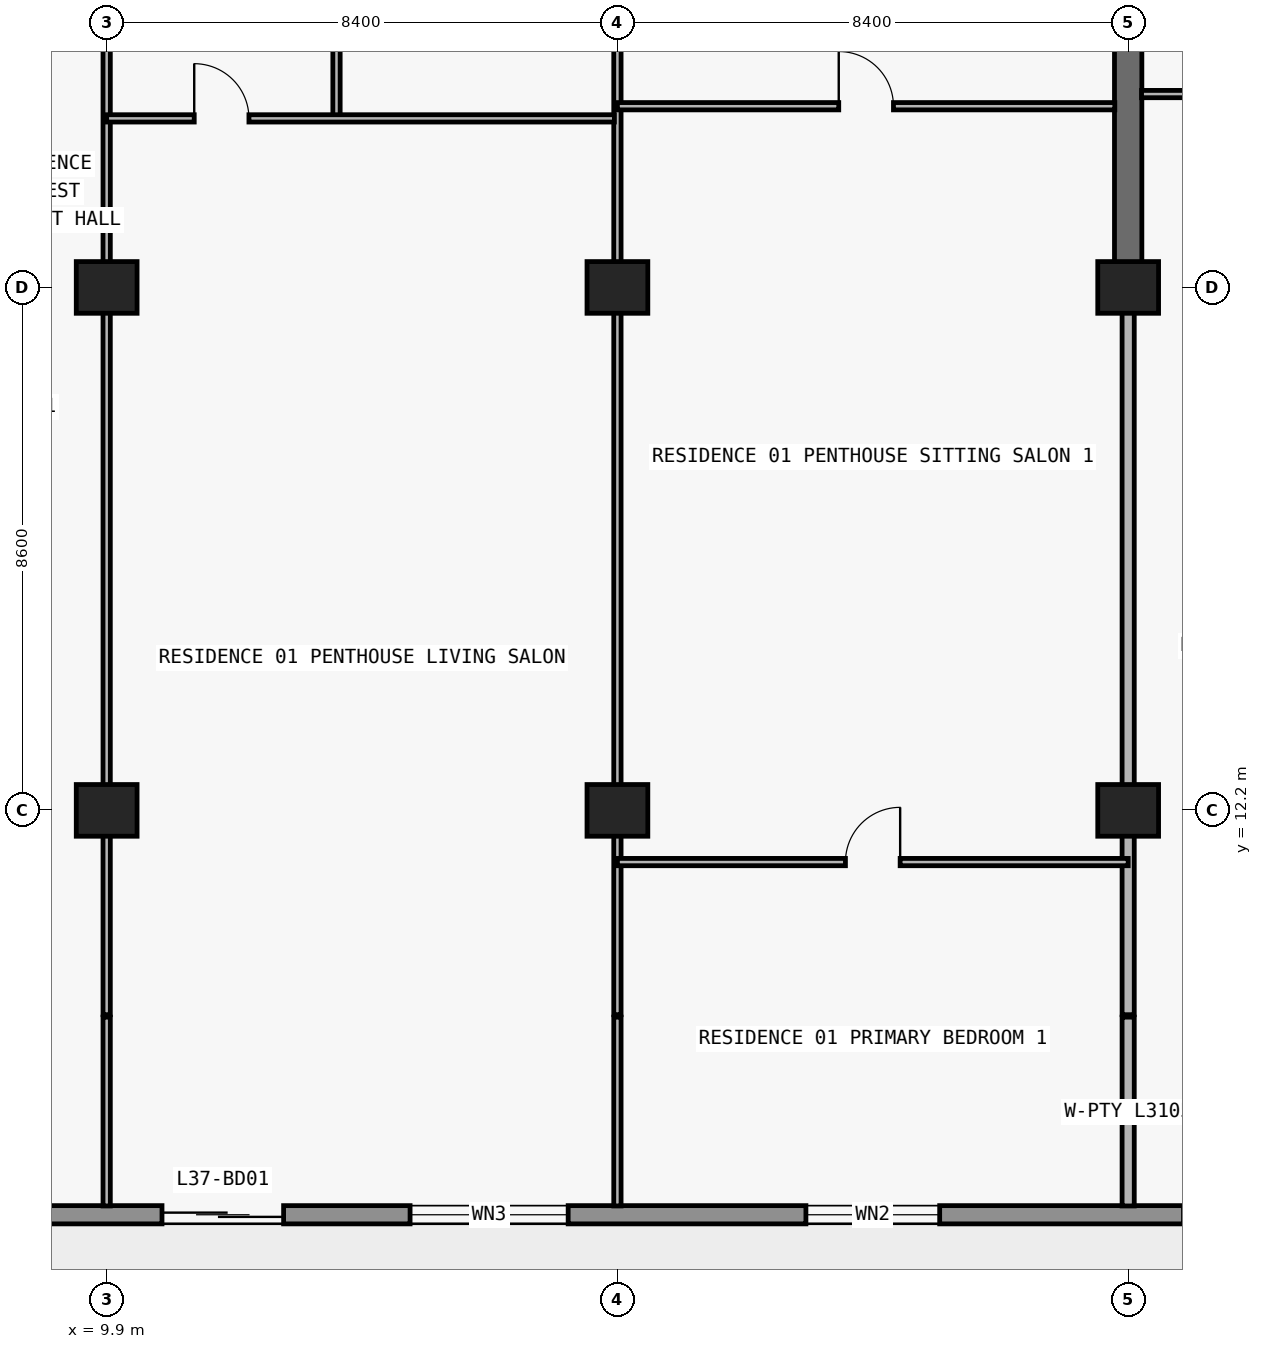
"""IFC4 building model, lengths in metres.
Left out: names, types, materials, properties, quantities, classifications, styles, units other than length and angle.
Written with IfcOpenShell. Run it as: python <this file> out.ifc"""

import sys

from ifc_helpers import new_model, si_unit, direction, frame, frame_2d, origin, origin_2d, place, context, subcontext, project, spatial, rectangle, extrude, element, fill, save


model = new_model("IFC4")
c1 = context("Model", 3, precision=1e-05, world=origin(), true_north=direction((0.0, 1.0)))
c2 = subcontext(c1, "Body", "Model", "MODEL_VIEW")
j1 = project(units=[si_unit("LENGTHUNIT", "METRE"), si_unit("PLANEANGLEUNIT", "RADIAN")], contexts=[c1])
p1 = place(None, origin())
s1 = spatial("IfcSite", under=j1, at=p1, CompositionType="ELEMENT")
p2 = place(p1, origin())
s2 = spatial("IfcBuilding", under=s1, at=p2, CompositionType="ELEMENT")
p3 = place(p2, frame((0.0, 0.0, 135.6)))
s3 = spatial("IfcBuildingStorey", under=s2, at=p3, CompositionType="ELEMENT", Elevation=135.6)
for number, where, z_axis, x_axis in (
    (1, (9.9, 12.2, 0.0), (0.0, 0.0, 1.0), (1.0, 0.0, 0.0)),
    (2, (18.3, 12.2, 0.0), (0.0, 0.0, 1.0), (1.0, 0.0, 0.0)),
    (3, (26.7, 12.2, 0.0), (0.0, 0.0, 1.0), (1.0, 0.0, 0.0)),
    (4, (9.9, 20.8, 0.0), (0.0, 0.0, 1.0), (1.0, 0.0, 0.0)),
    (5, (18.3, 20.8, 0.0), (0.0, 0.0, 1.0), (1.0, 0.0, 0.0)),
    (6, (26.7, 20.8, 0.0), (0.0, 0.0, 1.0), (1.0, 0.0, 0.0)),
):
    element("IfcColumn", number, at=place(p3, frame(where, z_axis=z_axis, x_axis=x_axis)), inside=s3, PredefinedType="COLUMN", context=c2, shape_type="SweptSolid", body=[
        extrude(rectangle(XDim=1.0, YDim=0.85, at=origin_2d()), origin(), (0.0, 0.0, 1.0), 3.05),
    ])
p4 = place(p3, frame((26.7, 20.8, 0.0), z_axis=(0.0, 0.0, 1.0), x_axis=(0.0, 1.0, 0.0)))
e7 = element("IfcWall", 7, at=p4, inside=s3, PredefinedType="SHEAR", context=c2, shape_type="SweptSolid", body=[
    extrude(rectangle(XDim=8.6, YDim=0.45, at=frame_2d((4.3, 0.0))), origin(), (0.0, 0.0, 1.0), 3.05),
])
p5 = place(p3, frame((70.1, 5.55, 0.0), z_axis=(0.0, 0.0, 1.0), x_axis=(-1.0, 0.0, 0.0)))
e8 = element("IfcWall", 8, at=p5, inside=s3, PredefinedType="STANDARD", context=c2, shape_type="SweptSolid", body=[
    extrude(rectangle(XDim=62.4, YDim=0.3, at=frame_2d((31.2, 0.0))), origin(), (0.0, 0.0, 1.0), 3.05),
])
p6 = place(p5, frame((57.29, 0.0, 0.0)))
e9 = element("IfcOpeningElement", 9, at=p6, cuts=e8, PredefinedType="OPENING", context=c2, shape_type="SweptSolid", body=[
    extrude(rectangle(XDim=2.0, YDim=2.3, at=frame_2d((1.0, 1.15))), frame((0.0, 0.16, 0.0), z_axis=(0.0, -1.0, 0.0), x_axis=(1.0, 0.0, 0.0)), (0.0, 0.0, 1.0), 0.32),
])
p7 = place(p5, frame((52.61, 0.0, 0.65)))
e10 = element("IfcOpeningElement", 10, at=p7, cuts=e8, PredefinedType="OPENING", context=c2, shape_type="SweptSolid", body=[
    extrude(rectangle(XDim=2.6, YDim=1.85, at=frame_2d((1.3, 0.925))), frame((0.0, 0.16, 0.0), z_axis=(0.0, -1.0, 0.0), x_axis=(1.0, 0.0, 0.0)), (0.0, 0.0, 1.0), 0.32),
])
p8 = place(p5, frame((46.5, 0.0, 0.85)))
e11 = element("IfcOpeningElement", 11, at=p8, cuts=e8, PredefinedType="OPENING", context=c2, shape_type="SweptSolid", body=[
    extrude(rectangle(XDim=2.2, YDim=1.55, at=frame_2d((1.1, 0.775))), frame((0.0, 0.16, 0.0), z_axis=(0.0, -1.0, 0.0), x_axis=(1.0, 0.0, 0.0)), (0.0, 0.0, 1.0), 0.32),
])
p9 = place(p5, frame((40.49, 0.0, 0.0)))
e12 = element("IfcOpeningElement", 12, at=p9, cuts=e8, PredefinedType="OPENING", context=c2, shape_type="SweptSolid", body=[
    extrude(rectangle(XDim=2.0, YDim=2.3, at=frame_2d((1.0, 1.15))), frame((0.0, 0.16, 0.0), z_axis=(0.0, -1.0, 0.0), x_axis=(1.0, 0.0, 0.0)), (0.0, 0.0, 1.0), 0.32),
])
p10 = place(p5, frame((35.81, 0.0, 0.65)))
e13 = element("IfcOpeningElement", 13, at=p10, cuts=e8, PredefinedType="OPENING", context=c2, shape_type="SweptSolid", body=[
    extrude(rectangle(XDim=2.6, YDim=1.85, at=frame_2d((1.3, 0.925))), frame((0.0, 0.16, 0.0), z_axis=(0.0, -1.0, 0.0), x_axis=(1.0, 0.0, 0.0)), (0.0, 0.0, 1.0), 0.32),
])
p11 = place(p5, frame((30.1, 0.0, 0.85)))
e14 = element("IfcOpeningElement", 14, at=p11, cuts=e8, PredefinedType="OPENING", context=c2, shape_type="SweptSolid", body=[
    extrude(rectangle(XDim=2.2, YDim=1.55, at=frame_2d((1.1, 0.775))), frame((0.0, 0.16, 0.0), z_axis=(0.0, -1.0, 0.0), x_axis=(1.0, 0.0, 0.0)), (0.0, 0.0, 1.0), 0.32),
])
p12 = place(p5, frame((22.1, 0.0, 0.85)))
e15 = element("IfcOpeningElement", 15, at=p12, cuts=e8, PredefinedType="OPENING", context=c2, shape_type="SweptSolid", body=[
    extrude(rectangle(XDim=2.2, YDim=1.55, at=frame_2d((1.1, 0.775))), frame((0.0, 0.16, 0.0), z_axis=(0.0, -1.0, 0.0), x_axis=(1.0, 0.0, 0.0)), (0.0, 0.0, 1.0), 0.32),
])
p13 = place(p5, frame((16.026, 0.0, 0.0)))
e16 = element("IfcOpeningElement", 16, at=p13, cuts=e8, PredefinedType="OPENING", context=c2, shape_type="SweptSolid", body=[
    extrude(rectangle(XDim=2.0, YDim=2.3, at=frame_2d((1.0, 1.15))), frame((0.0, 0.16, 0.0), z_axis=(0.0, -1.0, 0.0), x_axis=(1.0, 0.0, 0.0)), (0.0, 0.0, 1.0), 0.32),
])
p14 = place(p5, frame((11.726, 0.0, 0.85)))
e17 = element("IfcOpeningElement", 17, at=p14, cuts=e8, PredefinedType="OPENING", context=c2, shape_type="SweptSolid", body=[
    extrude(rectangle(XDim=2.2, YDim=1.55, at=frame_2d((1.1, 0.775))), frame((0.0, 0.16, 0.0), z_axis=(0.0, -1.0, 0.0), x_axis=(1.0, 0.0, 0.0)), (0.0, 0.0, 1.0), 0.32),
])
p15 = place(p5, frame((7.29, 0.0, 0.0)))
e18 = element("IfcOpeningElement", 18, at=p15, cuts=e8, PredefinedType="OPENING", context=c2, shape_type="SweptSolid", body=[
    extrude(rectangle(XDim=2.0, YDim=2.3, at=frame_2d((1.0, 1.15))), frame((0.0, 0.16, 0.0), z_axis=(0.0, -1.0, 0.0), x_axis=(1.0, 0.0, 0.0)), (0.0, 0.0, 1.0), 0.32),
])
p16 = place(p5, frame((3.19, 0.0, 0.85)))
e19 = element("IfcOpeningElement", 19, at=p16, cuts=e8, PredefinedType="OPENING", context=c2, shape_type="SweptSolid", body=[
    extrude(rectangle(XDim=1.8, YDim=1.55, at=frame_2d((0.9, 0.775))), frame((0.0, 0.16, 0.0), z_axis=(0.0, -1.0, 0.0), x_axis=(1.0, 0.0, 0.0)), (0.0, 0.0, 1.0), 0.32),
])
p17 = place(p3, frame((9.9, 5.695, 0.0), z_axis=(0.0, 0.0, 1.0), x_axis=(0.0, 1.0, 0.0)))
e20 = element("IfcWall", 20, at=p17, inside=s3, PredefinedType="PARTITIONING", context=c2, shape_type="SweptSolid", body=[
    extrude(rectangle(XDim=3.105, YDim=0.12, at=frame_2d((1.552, 0.0))), origin(), (0.0, 0.0, 1.0), 3.05),
])
p18 = place(p3, frame((9.9, 8.84, 0.0), z_axis=(0.0, 0.0, 1.0), x_axis=(0.0, 1.0, 0.0)))
e21 = element("IfcWall", 21, at=p18, inside=s3, PredefinedType="PARTITIONING", context=c2, shape_type="SweptSolid", body=[
    extrude(rectangle(XDim=19.94, YDim=0.12, at=frame_2d((9.97, 0.0))), origin(), (0.0, 0.0, 1.0), 2.174),
])
p19 = place(p18, frame((16.69, 0.0, 0.0)))
e22 = element("IfcOpeningElement", 22, at=p19, cuts=e21, PredefinedType="OPENING", context=c2, shape_type="SweptSolid", body=[
    extrude(rectangle(XDim=0.9, YDim=2.124, at=frame_2d((0.45, 1.062))), frame((0.0, 0.07, 0.0), z_axis=(0.0, -1.0, 0.0), x_axis=(1.0, 0.0, 0.0)), (0.0, 0.0, 1.0), 0.14),
])
p20 = place(p3, frame((13.68, 23.58, 0.0), z_axis=(0.0, 0.0, 1.0), x_axis=(0.0, 1.0, 0.0)))
e23 = element("IfcWall", 23, at=p20, inside=s3, PredefinedType="PARTITIONING", context=c2, shape_type="SweptSolid", body=[
    extrude(rectangle(XDim=4.8, YDim=0.12, at=frame_2d((2.4, 0.0))), origin(), (0.0, 0.0, 1.0), 3.05),
])
p21 = place(p20, frame((1.95, 0.0, 0.0)))
e24 = element("IfcOpeningElement", 24, at=p21, cuts=e23, PredefinedType="OPENING", context=c2, shape_type="SweptSolid", body=[
    extrude(rectangle(XDim=0.9, YDim=2.15, at=frame_2d((0.45, 1.075))), frame((0.0, 0.07, 0.0), z_axis=(0.0, -1.0, 0.0), x_axis=(1.0, 0.0, 0.0)), (0.0, 0.0, 1.0), 0.14),
])
p22 = place(p3, frame((18.3, 5.695, 0.0), z_axis=(0.0, 0.0, 1.0), x_axis=(0.0, 1.0, 0.0)))
e25 = element("IfcWall", 25, at=p22, inside=s3, PredefinedType="PARTITIONING", context=c2, shape_type="SweptSolid", body=[
    extrude(rectangle(XDim=3.105, YDim=0.12, at=frame_2d((1.552, 0.0))), origin(), (0.0, 0.0, 1.0), 3.05),
])
p23 = place(p3, frame((18.3, 8.84, 0.0), z_axis=(0.0, 0.0, 1.0), x_axis=(0.0, 1.0, 0.0)))
e26 = element("IfcWall", 26, at=p23, inside=s3, PredefinedType="PARTITIONING", context=c2, shape_type="SweptSolid", body=[
    extrude(rectangle(XDim=19.94, YDim=0.12, at=frame_2d((9.97, 0.0))), origin(), (0.0, 0.0, 1.0), 2.174),
])
p24 = place(p23, frame((16.69, 0.0, 0.0)))
e27 = element("IfcOpeningElement", 27, at=p24, cuts=e26, PredefinedType="OPENING", context=c2, shape_type="SweptSolid", body=[
    extrude(rectangle(XDim=0.9, YDim=2.124, at=frame_2d((0.45, 1.062))), frame((0.0, 0.07, 0.0), z_axis=(0.0, -1.0, 0.0), x_axis=(1.0, 0.0, 0.0)), (0.0, 0.0, 1.0), 0.14),
])
p25 = place(p3, frame((26.7, 5.695, 0.0), z_axis=(0.0, 0.0, 1.0), x_axis=(0.0, 1.0, 0.0)))
e28 = element("IfcWall", 28, at=p25, inside=s3, PredefinedType="PARTITIONING", context=c2, shape_type="SweptSolid", body=[
    extrude(rectangle(XDim=3.105, YDim=0.2, at=frame_2d((1.552, 0.0))), origin(), (0.0, 0.0, 1.0), 3.05),
])
p26 = place(p3, frame((26.7, 8.84, 0.0), z_axis=(0.0, 0.0, 1.0), x_axis=(0.0, 1.0, 0.0)))
e29 = element("IfcWall", 29, at=p26, inside=s3, PredefinedType="PARTITIONING", context=c2, shape_type="SweptSolid", body=[
    extrude(rectangle(XDim=11.955, YDim=0.2, at=frame_2d((5.978, 0.0))), origin(), (0.0, 0.0, 1.0), 2.174),
])
p27 = place(p3, frame((18.3, 11.35, 0.0), z_axis=(0.0, 0.0, 1.0), x_axis=(1.0, 0.0, 0.0)))
e30 = element("IfcWall", 30, at=p27, inside=s3, PredefinedType="PARTITIONING", context=c2, shape_type="SweptSolid", body=[
    extrude(rectangle(XDim=8.4, YDim=0.12, at=frame_2d((4.2, 0.0))), origin(), (0.0, 0.0, 1.0), 3.05),
])
p28 = place(p27, frame((3.75, 0.0, 0.0)))
e31 = element("IfcOpeningElement", 31, at=p28, cuts=e30, PredefinedType="OPENING", context=c2, shape_type="SweptSolid", body=[
    extrude(rectangle(XDim=0.9, YDim=2.15, at=frame_2d((0.45, 1.075))), frame((0.0, 0.07, 0.0), z_axis=(0.0, -1.0, 0.0), x_axis=(1.0, 0.0, 0.0)), (0.0, 0.0, 1.0), 0.14),
])
p29 = place(p3, frame((9.9, 23.58, 0.0), z_axis=(0.0, 0.0, 1.0), x_axis=(1.0, 0.0, 0.0)))
e32 = element("IfcWall", 32, at=p29, inside=s3, PredefinedType="PARTITIONING", context=c2, shape_type="SweptSolid", body=[
    extrude(rectangle(XDim=8.35, YDim=0.12, at=frame_2d((4.175, 0.0))), origin(), (0.0, 0.0, 1.0), 3.05),
])
p30 = place(p29, frame((1.44, 0.0, 0.0)))
e33 = element("IfcOpeningElement", 33, at=p30, cuts=e32, PredefinedType="OPENING", context=c2, shape_type="SweptSolid", body=[
    extrude(rectangle(XDim=0.9, YDim=2.15, at=frame_2d((0.45, 1.075))), frame((0.0, 0.07, 0.0), z_axis=(0.0, -1.0, 0.0), x_axis=(1.0, 0.0, 0.0)), (0.0, 0.0, 1.0), 0.14),
])
p31 = place(p3, frame((18.3, 23.78, 0.0), z_axis=(0.0, 0.0, 1.0), x_axis=(1.0, 0.0, 0.0)))
e34 = element("IfcWall", 34, at=p31, inside=s3, PredefinedType="PARTITIONING", context=c2, shape_type="SweptSolid", body=[
    extrude(rectangle(XDim=8.18, YDim=0.12, at=frame_2d((4.09, 0.0))), origin(), (0.0, 0.0, 1.0), 3.05),
])
p32 = place(p31, frame((3.64, 0.0, 0.0)))
e35 = element("IfcOpeningElement", 35, at=p32, cuts=e34, PredefinedType="OPENING", context=c2, shape_type="SweptSolid", body=[
    extrude(rectangle(XDim=0.9, YDim=2.15, at=frame_2d((0.45, 1.075))), frame((0.0, 0.07, 0.0), z_axis=(0.0, -1.0, 0.0), x_axis=(1.0, 0.0, 0.0)), (0.0, 0.0, 1.0), 0.14),
])
p33 = place(p3, frame((26.92, 23.98, 0.0), z_axis=(0.0, 0.0, 1.0), x_axis=(1.0, 0.0, 0.0)))
e36 = element("IfcWall", 36, at=p33, inside=s3, PredefinedType="PARTITIONING", context=c2, shape_type="SweptSolid", body=[
    extrude(rectangle(XDim=8.18, YDim=0.12, at=frame_2d((4.09, 0.0))), origin(), (0.0, 0.0, 1.0), 3.05),
])
p34 = place(p33, frame((1.204, 0.0, 0.0)))
e37 = element("IfcOpeningElement", 37, at=p34, cuts=e36, PredefinedType="OPENING", context=c2, shape_type="SweptSolid", body=[
    extrude(rectangle(XDim=0.9, YDim=2.15, at=frame_2d((0.45, 1.075))), frame((0.0, 0.07, 0.0), z_axis=(0.0, -1.0, 0.0), x_axis=(1.0, 0.0, 0.0)), (0.0, 0.0, 1.0), 0.14),
])
p35 = place(p6, origin())
e38 = element("IfcDoor", 38, at=p35, inside=s3, OperationType="DOUBLE_DOOR_SLIDING", PredefinedType="DOOR", context=c2, shape_type="SweptSolid", body=[
    extrude(rectangle(XDim=2.0, YDim=2.3, at=frame_2d((1.0, 1.15))), frame((0.0, 0.025, 0.0), z_axis=(0.0, -1.0, 0.0), x_axis=(1.0, 0.0, 0.0)), (0.0, 0.0, 1.0), 0.05),
])
fill(e9, e38)
p36 = place(p7, origin())
e39 = element("IfcWindow", 39, at=p36, inside=s3, PartitioningType="SINGLE_PANEL", PredefinedType="WINDOW", context=c2, shape_type="SweptSolid", body=[
    extrude(rectangle(XDim=2.6, YDim=1.85, at=frame_2d((1.3, 0.925))), frame((0.0, 0.03, 0.0), z_axis=(0.0, -1.0, 0.0), x_axis=(1.0, 0.0, 0.0)), (0.0, 0.0, 1.0), 0.06),
])
fill(e10, e39)
p37 = place(p8, origin())
e40 = element("IfcWindow", 40, at=p37, inside=s3, PartitioningType="SINGLE_PANEL", PredefinedType="WINDOW", context=c2, shape_type="SweptSolid", body=[
    extrude(rectangle(XDim=2.2, YDim=1.55, at=frame_2d((1.1, 0.775))), frame((0.0, 0.03, 0.0), z_axis=(0.0, -1.0, 0.0), x_axis=(1.0, 0.0, 0.0)), (0.0, 0.0, 1.0), 0.06),
])
fill(e11, e40)
p38 = place(p30, origin())
e41 = element("IfcDoor", 41, at=p38, inside=s3, OperationType="SINGLE_SWING_LEFT", PredefinedType="DOOR", context=c2, shape_type="SweptSolid", body=[
    extrude(rectangle(XDim=0.9, YDim=2.15, at=frame_2d((0.45, 1.075))), frame((0.0, 0.025, 0.0), z_axis=(0.0, -1.0, 0.0), x_axis=(1.0, 0.0, 0.0)), (0.0, 0.0, 1.0), 0.05),
])
fill(e33, e41)
p39 = place(p32, origin())
e42 = element("IfcDoor", 42, at=p39, inside=s3, OperationType="SINGLE_SWING_LEFT", PredefinedType="DOOR", context=c2, shape_type="SweptSolid", body=[
    extrude(rectangle(XDim=0.9, YDim=2.15, at=frame_2d((0.45, 1.075))), frame((0.0, 0.025, 0.0), z_axis=(0.0, -1.0, 0.0), x_axis=(1.0, 0.0, 0.0)), (0.0, 0.0, 1.0), 0.05),
])
fill(e35, e42)
p40 = place(p28, origin())
e43 = element("IfcDoor", 43, at=p40, inside=s3, OperationType="SINGLE_SWING_RIGHT", PredefinedType="DOOR", context=c2, shape_type="SweptSolid", body=[
    extrude(rectangle(XDim=0.9, YDim=2.15, at=frame_2d((0.45, 1.075))), frame((0.0, 0.025, 0.0), z_axis=(0.0, -1.0, 0.0), x_axis=(1.0, 0.0, 0.0)), (0.0, 0.0, 1.0), 0.05),
])
fill(e31, e43)
save(model, sys.argv[1])
